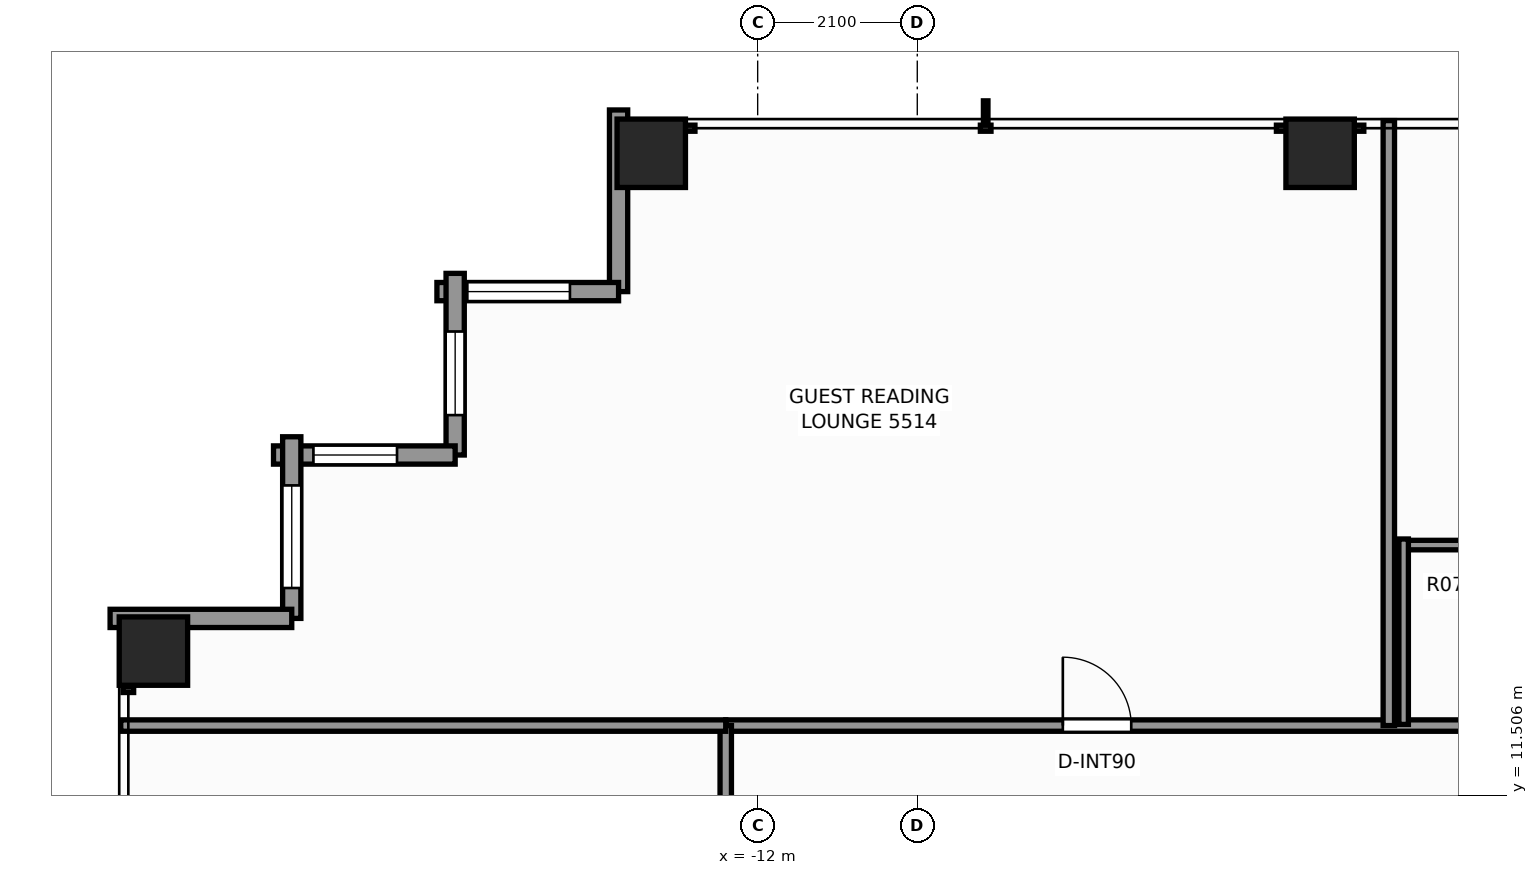
"""IFC4 building model, lengths in metres.
Left out: names, types, materials, properties, quantities, classifications, styles, units other than length and angle.
Written with IfcOpenShell. Run it as: python <this file> out.ifc"""

import sys

from ifc_helpers import new_model, si_unit, direction, frame, frame_2d, origin, origin_2d, place, context, subcontext, project, spatial, rectangle, extrude, element, fill, save


model = new_model("IFC4")
c1 = context("Model", 3, precision=1e-05, world=origin(), true_north=direction((0.0, 1.0)))
c2 = subcontext(c1, "Body", "Model", "MODEL_VIEW")
j1 = project(units=[si_unit("LENGTHUNIT", "METRE"), si_unit("PLANEANGLEUNIT", "RADIAN")], contexts=[c1])
p1 = place(None, origin())
s1 = spatial("IfcSite", under=j1, at=p1, CompositionType="ELEMENT")
p2 = place(p1, origin())
s2 = spatial("IfcBuilding", under=s1, at=p2, CompositionType="ELEMENT")
p3 = place(p2, frame((0.0, 0.0, 189.9)))
s3 = spatial("IfcBuildingStorey", under=s2, at=p3, CompositionType="ELEMENT", Elevation=189.9)
for number, where, z_axis, x_axis in (
    (1, (-13.4, 19.95, 0.0), (0.0, 0.0, 1.0), (1.0, 0.0, 0.0)),
    (2, (-4.6, 19.95, 0.0), (0.0, 0.0, 1.0), (1.0, 0.0, 0.0)),
    (3, (-19.95, 13.4, 0.0), (0.0, 0.0, 1.0), (1.0, 0.0, 0.0)),
):
    element("IfcColumn", number, at=place(p3, frame(where, z_axis=z_axis, x_axis=x_axis)), inside=s3, PredefinedType="COLUMN", context=c2, shape_type="SweptSolid", body=[
        extrude(rectangle(XDim=0.9, YDim=0.9, at=origin_2d()), origin(), (0.0, 0.0, 1.0), 3.3),
    ])
p4 = place(p3, frame((-13.83, 18.13, 0.0), z_axis=(0.0, 0.0, 1.0), x_axis=(0.0, 1.0, 0.0)))
e4 = element("IfcWall", 4, at=p4, inside=s3, PredefinedType="STANDARD", context=c2, shape_type="SweptSolid", body=[
    extrude(rectangle(XDim=2.39, YDim=0.24, at=frame_2d((1.195, 0.0))), origin(), (0.0, 0.0, 1.0), 2.463),
])
p5 = place(p3, frame((-16.22, 18.13, 0.0), z_axis=(0.0, 0.0, 1.0), x_axis=(1.0, 0.0, 0.0)))
e5 = element("IfcWall", 5, at=p5, inside=s3, PredefinedType="STANDARD", context=c2, shape_type="SweptSolid", body=[
    extrude(rectangle(XDim=2.39, YDim=0.24, at=frame_2d((1.195, 0.0))), origin(), (0.0, 0.0, 1.0), 2.463),
])
p6 = place(p5, frame((0.4, 0.0, 0.65)))
e6 = element("IfcOpeningElement", 6, at=p6, cuts=e5, PredefinedType="OPENING", context=c2, shape_type="SweptSolid", body=[
    extrude(rectangle(XDim=1.35, YDim=1.55, at=frame_2d((0.675, 0.775))), frame((0.0, 0.13, 0.0), z_axis=(0.0, -1.0, 0.0), x_axis=(1.0, 0.0, 0.0)), (0.0, 0.0, 1.0), 0.26),
])
p7 = place(p3, frame((-15.98, 15.98, 0.0), z_axis=(0.0, 0.0, 1.0), x_axis=(0.0, 1.0, 0.0)))
e7 = element("IfcWall", 7, at=p7, inside=s3, PredefinedType="STANDARD", context=c2, shape_type="SweptSolid", body=[
    extrude(rectangle(XDim=2.39, YDim=0.24, at=frame_2d((1.195, 0.0))), origin(), (0.0, 0.0, 1.0), 2.463),
])
p8 = place(p7, frame((0.525, 0.0, 0.65)))
e8 = element("IfcOpeningElement", 8, at=p8, cuts=e7, PredefinedType="OPENING", context=c2, shape_type="SweptSolid", body=[
    extrude(rectangle(XDim=1.1, YDim=1.45, at=frame_2d((0.55, 0.725))), frame((0.0, 0.13, 0.0), z_axis=(0.0, -1.0, 0.0), x_axis=(1.0, 0.0, 0.0)), (0.0, 0.0, 1.0), 0.26),
])
p9 = place(p3, frame((-18.37, 15.98, 0.0), z_axis=(0.0, 0.0, 1.0), x_axis=(1.0, 0.0, 0.0)))
e9 = element("IfcWall", 9, at=p9, inside=s3, PredefinedType="STANDARD", context=c2, shape_type="SweptSolid", body=[
    extrude(rectangle(XDim=2.39, YDim=0.24, at=frame_2d((1.195, 0.0))), origin(), (0.0, 0.0, 1.0), 2.463),
])
p10 = place(p9, frame((0.525, 0.0, 0.65)))
e10 = element("IfcOpeningElement", 10, at=p10, cuts=e9, PredefinedType="OPENING", context=c2, shape_type="SweptSolid", body=[
    extrude(rectangle(XDim=1.1, YDim=1.45, at=frame_2d((0.55, 0.725))), frame((0.0, 0.13, 0.0), z_axis=(0.0, -1.0, 0.0), x_axis=(1.0, 0.0, 0.0)), (0.0, 0.0, 1.0), 0.26),
])
p11 = place(p3, frame((-18.13, 13.83, 0.0), z_axis=(0.0, 0.0, 1.0), x_axis=(0.0, 1.0, 0.0)))
e11 = element("IfcWall", 11, at=p11, inside=s3, PredefinedType="STANDARD", context=c2, shape_type="SweptSolid", body=[
    extrude(rectangle(XDim=2.39, YDim=0.24, at=frame_2d((1.195, 0.0))), origin(), (0.0, 0.0, 1.0), 2.463),
])
p12 = place(p11, frame((0.4, 0.0, 0.65)))
e12 = element("IfcOpeningElement", 12, at=p12, cuts=e11, PredefinedType="OPENING", context=c2, shape_type="SweptSolid", body=[
    extrude(rectangle(XDim=1.35, YDim=1.55, at=frame_2d((0.675, 0.775))), frame((0.0, 0.13, 0.0), z_axis=(0.0, -1.0, 0.0), x_axis=(1.0, 0.0, 0.0)), (0.0, 0.0, 1.0), 0.26),
])
p13 = place(p3, frame((-20.52, 13.83, 0.0), z_axis=(0.0, 0.0, 1.0), x_axis=(1.0, 0.0, 0.0)))
e13 = element("IfcWall", 13, at=p13, inside=s3, PredefinedType="STANDARD", context=c2, shape_type="SweptSolid", body=[
    extrude(rectangle(XDim=2.39, YDim=0.24, at=frame_2d((1.195, 0.0))), origin(), (0.0, 0.0, 1.0), 2.463),
])
p14 = place(p3, frame((-12.42, 12.42, 0.0), z_axis=(0.0, 0.0, 1.0), x_axis=(1.0, 0.0, 0.0)))
e14 = element("IfcWall", 14, at=p14, inside=s3, PredefinedType="PARTITIONING", context=c2, shape_type="SweptSolid", body=[
    extrude(rectangle(XDim=25.0, YDim=0.15, at=frame_2d((12.5, 0.0))), origin(), (0.0, 0.0, 1.0), 2.369),
])
p15 = place(p14, frame((4.435, 0.0, 0.0)))
e15 = element("IfcOpeningElement", 15, at=p15, cuts=e14, PredefinedType="OPENING", context=c2, shape_type="SweptSolid", body=[
    extrude(rectangle(XDim=0.9, YDim=2.06, at=frame_2d((0.45, 1.03))), frame((0.0, 0.085, 0.0), z_axis=(0.0, -1.0, 0.0), x_axis=(1.0, 0.0, 0.0)), (0.0, 0.0, 1.0), 0.17),
])
p16 = place(p14, frame((13.968, 0.0, 0.0)))
e16 = element("IfcOpeningElement", 16, at=p16, cuts=e14, PredefinedType="OPENING", context=c2, shape_type="SweptSolid", body=[
    extrude(rectangle(XDim=0.95, YDim=2.06, at=frame_2d((0.475, 1.03))), frame((0.0, 0.085, 0.0), z_axis=(0.0, -1.0, 0.0), x_axis=(1.0, 0.0, 0.0)), (0.0, 0.0, 1.0), 0.17),
])
p17 = place(p14, frame((19.505, 0.0, 0.0)))
e17 = element("IfcOpeningElement", 17, at=p17, cuts=e14, PredefinedType="OPENING", context=c2, shape_type="SweptSolid", body=[
    extrude(rectangle(XDim=0.9, YDim=2.06, at=frame_2d((0.45, 1.03))), frame((0.0, 0.085, 0.0), z_axis=(0.0, -1.0, 0.0), x_axis=(1.0, 0.0, 0.0)), (0.0, 0.0, 1.0), 0.17),
])
p18 = place(p3, frame((-12.42, -12.42, 0.0), z_axis=(0.0, 0.0, 1.0), x_axis=(0.0, 1.0, 0.0)))
e18 = element("IfcWall", 18, at=p18, inside=s3, PredefinedType="PARTITIONING", context=c2, shape_type="SweptSolid", body=[
    extrude(rectangle(XDim=24.84, YDim=0.15, at=frame_2d((12.42, 0.0))), origin(), (0.0, 0.0, 1.0), 2.369),
])
p19 = place(p18, frame((3.323, 0.0, 0.0)))
e19 = element("IfcOpeningElement", 19, at=p19, cuts=e18, PredefinedType="OPENING", context=c2, shape_type="SweptSolid", body=[
    extrude(rectangle(XDim=0.95, YDim=2.06, at=frame_2d((0.475, 1.03))), frame((0.0, 0.085, 0.0), z_axis=(0.0, -1.0, 0.0), x_axis=(1.0, 0.0, 0.0)), (0.0, 0.0, 1.0), 0.17),
])
p20 = place(p18, frame((9.039, 0.0, 0.0)))
e20 = element("IfcOpeningElement", 20, at=p20, cuts=e18, PredefinedType="OPENING", context=c2, shape_type="SweptSolid", body=[
    extrude(rectangle(XDim=0.95, YDim=2.06, at=frame_2d((0.475, 1.03))), frame((0.0, 0.085, 0.0), z_axis=(0.0, -1.0, 0.0), x_axis=(1.0, 0.0, 0.0)), (0.0, 0.0, 1.0), 0.17),
])
p21 = place(p18, frame((14.341, 0.0, 0.0)))
e21 = element("IfcOpeningElement", 21, at=p21, cuts=e18, PredefinedType="OPENING", context=c2, shape_type="SweptSolid", body=[
    extrude(rectangle(XDim=0.95, YDim=2.06, at=frame_2d((0.475, 1.03))), frame((0.0, 0.085, 0.0), z_axis=(0.0, -1.0, 0.0), x_axis=(1.0, 0.0, 0.0)), (0.0, 0.0, 1.0), 0.17),
])
p22 = place(p18, frame((20.375, 0.0, 0.0)))
e22 = element("IfcOpeningElement", 22, at=p22, cuts=e18, PredefinedType="OPENING", context=c2, shape_type="SweptSolid", body=[
    extrude(rectangle(XDim=0.95, YDim=2.06, at=frame_2d((0.475, 1.03))), frame((0.0, 0.085, 0.0), z_axis=(0.0, -1.0, 0.0), x_axis=(1.0, 0.0, 0.0)), (0.0, 0.0, 1.0), 0.17),
])
p23 = place(p3, frame((-20.38, 12.42, 0.0), z_axis=(0.0, 0.0, 1.0), x_axis=(1.0, 0.0, 0.0)))
e23 = element("IfcWall", 23, at=p23, inside=s3, PredefinedType="PARTITIONING", context=c2, shape_type="SweptSolid", body=[
    extrude(rectangle(XDim=7.96, YDim=0.15, at=frame_2d((3.98, 0.0))), origin(), (0.0, 0.0, 1.0), 2.369),
])
p24 = place(p3, frame((-3.696, 12.42, 0.0), z_axis=(0.0, 0.0, 1.0), x_axis=(0.0, 1.0, 0.0)))
e24 = element("IfcWall", 24, at=p24, inside=s3, PredefinedType="PARTITIONING", context=c2, shape_type="SweptSolid", body=[
    extrude(rectangle(XDim=7.96, YDim=0.15, at=frame_2d((3.98, 0.0))), origin(), (0.0, 0.0, 1.0), 2.453),
])
p25 = place(p3, frame((-3.561, 14.795, 0.0), z_axis=(0.0, 0.0, 1.0), x_axis=(1.0, 0.0, 0.0)))
e25 = element("IfcWall", 25, at=p25, inside=s3, PredefinedType="PARTITIONING", context=c2, shape_type="SweptSolid", body=[
    extrude(rectangle(XDim=2.27, YDim=0.125, at=frame_2d((1.135, 0.0))), origin(), (0.0, 0.0, 1.0), 2.369),
])
p26 = place(p3, frame((-3.501, 12.435, 0.0), z_axis=(0.0, 0.0, 1.0), x_axis=(0.0, 1.0, 0.0)))
e26 = element("IfcWall", 26, at=p26, inside=s3, PredefinedType="PARTITIONING", context=c2, shape_type="SweptSolid", body=[
    extrude(rectangle(XDim=2.44, YDim=0.125, at=frame_2d((1.22, 0.0))), origin(), (0.0, 0.0, 1.0), 3.08),
])
p27 = place(p6, origin())
e27 = element("IfcWindow", 27, at=p27, inside=s3, PartitioningType="SINGLE_PANEL", PredefinedType="WINDOW", context=c2, shape_type="SweptSolid", body=[
    extrude(rectangle(XDim=1.35, YDim=1.55, at=frame_2d((0.675, 0.775))), frame((0.0, 0.03, 0.0), z_axis=(0.0, -1.0, 0.0), x_axis=(1.0, 0.0, 0.0)), (0.0, 0.0, 1.0), 0.06),
])
fill(e6, e27)
p28 = place(p8, origin())
e28 = element("IfcWindow", 28, at=p28, inside=s3, PartitioningType="SINGLE_PANEL", PredefinedType="WINDOW", context=c2, shape_type="SweptSolid", body=[
    extrude(rectangle(XDim=1.1, YDim=1.45, at=frame_2d((0.55, 0.725))), frame((0.0, 0.03, 0.0), z_axis=(0.0, -1.0, 0.0), x_axis=(1.0, 0.0, 0.0)), (0.0, 0.0, 1.0), 0.06),
])
fill(e8, e28)
p29 = place(p10, origin())
e29 = element("IfcWindow", 29, at=p29, inside=s3, PartitioningType="SINGLE_PANEL", PredefinedType="WINDOW", context=c2, shape_type="SweptSolid", body=[
    extrude(rectangle(XDim=1.1, YDim=1.45, at=frame_2d((0.55, 0.725))), frame((0.0, 0.03, 0.0), z_axis=(0.0, -1.0, 0.0), x_axis=(1.0, 0.0, 0.0)), (0.0, 0.0, 1.0), 0.06),
])
fill(e10, e29)
p30 = place(p12, origin())
e30 = element("IfcWindow", 30, at=p30, inside=s3, PartitioningType="SINGLE_PANEL", PredefinedType="WINDOW", context=c2, shape_type="SweptSolid", body=[
    extrude(rectangle(XDim=1.35, YDim=1.55, at=frame_2d((0.675, 0.775))), frame((0.0, 0.03, 0.0), z_axis=(0.0, -1.0, 0.0), x_axis=(1.0, 0.0, 0.0)), (0.0, 0.0, 1.0), 0.06),
])
fill(e12, e30)
p31 = place(p15, origin())
e31 = element("IfcDoor", 31, at=p31, inside=s3, OperationType="SINGLE_SWING_LEFT", PredefinedType="DOOR", context=c2, shape_type="SweptSolid", body=[
    extrude(rectangle(XDim=0.9, YDim=2.06, at=frame_2d((0.45, 1.03))), frame((0.0, 0.025, 0.0), z_axis=(0.0, -1.0, 0.0), x_axis=(1.0, 0.0, 0.0)), (0.0, 0.0, 1.0), 0.05),
])
fill(e15, e31)
save(model, sys.argv[1])
